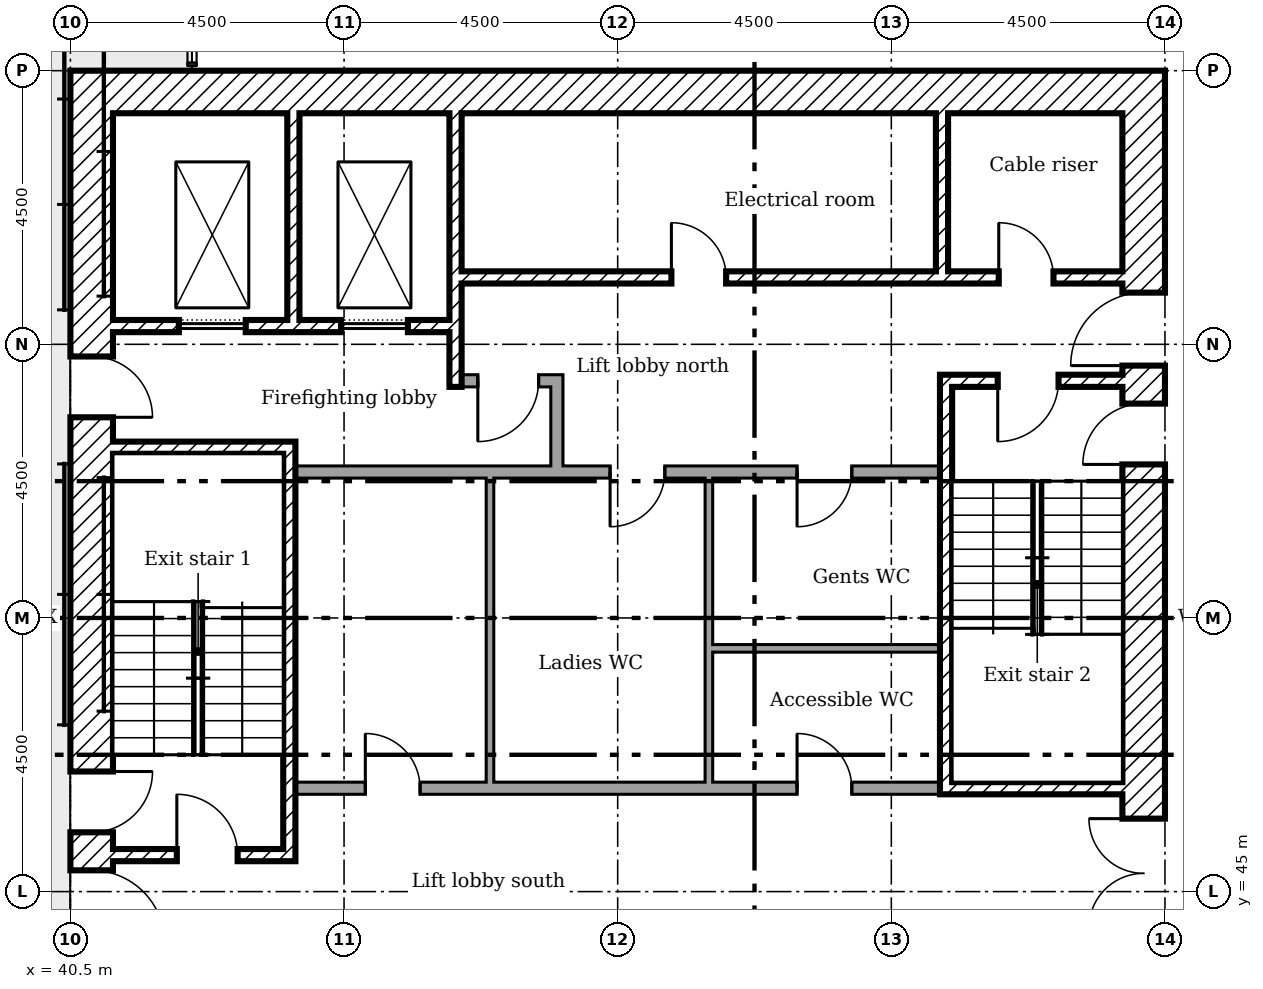
"""IFC4 building model, lengths in metres.
Left out: names, types, materials, properties, quantities, classifications, styles, units other than length and angle.
Written with IfcOpenShell. Run it as: python <this file> out.ifc"""

import sys

from ifc_helpers import new_model, si_unit, direction, frame, frame_2d, origin, place, context, subcontext, project, spatial, rectangle, extrude, element, fill, save


model = new_model("IFC4")
c1 = context("Model", 3, precision=1e-05, world=origin(), true_north=direction((0.0, 1.0)))
c2 = subcontext(c1, "Body", "Model", "MODEL_VIEW")
j1 = project(units=[si_unit("LENGTHUNIT", "METRE"), si_unit("PLANEANGLEUNIT", "RADIAN")], contexts=[c1])
p1 = place(None, origin())
s1 = spatial("IfcSite", under=j1, at=p1, CompositionType="ELEMENT")
p2 = place(p1, origin())
s2 = spatial("IfcBuilding", under=s1, at=p2, CompositionType="ELEMENT")
p3 = place(p2, frame((0.0, 0.0, 92.0)))
s3 = spatial("IfcBuildingStorey", under=s2, at=p3, CompositionType="ELEMENT", Elevation=92.0)
p4 = place(p3, frame((58.15, 40.5, 0.0), z_axis=(0.0, 0.0, 1.0), x_axis=(0.0, 1.0, 0.0)))
e1 = element("IfcWall", 1, at=p4, inside=s3, PredefinedType="SHEAR", context=c2, shape_type="SweptSolid", body=[
    extrude(rectangle(XDim=18.0, YDim=0.7, at=frame_2d((9.0, 0.0))), origin(), (0.0, 0.0, 1.0), 3.35),
])
p5 = place(p4, frame((13.15, 0.0, 0.0)))
e2 = element("IfcOpeningElement", 2, at=p5, cuts=e1, PredefinedType="OPENING", context=c2, shape_type="SweptSolid", body=[
    extrude(rectangle(XDim=1.2, YDim=2.1, at=frame_2d((0.6, 1.05))), frame((0.0, 0.36, 0.0), z_axis=(0.0, -1.0, 0.0), x_axis=(1.0, 0.0, 0.0)), (0.0, 0.0, 1.0), 0.72),
])
p6 = place(p4, frame((3.9, 0.0, 0.0)))
e3 = element("IfcOpeningElement", 3, at=p6, cuts=e1, PredefinedType="OPENING", context=c2, shape_type="SweptSolid", body=[
    extrude(rectangle(XDim=1.8, YDim=2.1, at=frame_2d((0.9, 1.05))), frame((0.0, 0.36, 0.0), z_axis=(0.0, -1.0, 0.0), x_axis=(1.0, 0.0, 0.0)), (0.0, 0.0, 1.0), 0.72),
])
p7 = place(p4, frame((11.525, 0.0, 0.0)))
e4 = element("IfcOpeningElement", 4, at=p7, cuts=e1, PredefinedType="OPENING", context=c2, shape_type="SweptSolid", body=[
    extrude(rectangle(XDim=1.0, YDim=2.1, at=frame_2d((0.5, 1.05))), frame((0.0, 0.36, 0.0), z_axis=(0.0, -1.0, 0.0), x_axis=(1.0, 0.0, 0.0)), (0.0, 0.0, 1.0), 0.72),
])
p8 = place(p3, frame((41.2, 58.15, 0.0)))
e5 = element("IfcWall", 5, at=p8, inside=s3, PredefinedType="SHEAR", context=c2, shape_type="SweptSolid", body=[
    extrude(rectangle(XDim=16.6, YDim=0.7, at=frame_2d((8.3, 0.0))), origin(), (0.0, 0.0, 1.0), 3.35),
])
p9 = place(p3, frame((40.85, 40.5, 0.0), z_axis=(0.0, 0.0, 1.0), x_axis=(0.0, 1.0, 0.0)))
e6 = element("IfcWall", 6, at=p9, inside=s3, PredefinedType="SHEAR", context=c2, shape_type="SweptSolid", body=[
    extrude(rectangle(XDim=18.0, YDim=0.7, at=frame_2d((9.0, 0.0))), origin(), (0.0, 0.0, 1.0), 3.35),
])
p10 = place(p9, frame((3.65, 0.0, 0.0)))
e7 = element("IfcOpeningElement", 7, at=p10, cuts=e6, PredefinedType="OPENING", context=c2, shape_type="SweptSolid", body=[
    extrude(rectangle(XDim=1.2, YDim=2.1, at=frame_2d((0.6, 1.05))), frame((0.0, 0.36, 0.0), z_axis=(0.0, -1.0, 0.0), x_axis=(1.0, 0.0, 0.0)), (0.0, 0.0, 1.0), 0.72),
])
p11 = place(p9, frame((5.475, 0.0, 0.0)))
e8 = element("IfcOpeningElement", 8, at=p11, cuts=e6, PredefinedType="OPENING", context=c2, shape_type="SweptSolid", body=[
    extrude(rectangle(XDim=1.0, YDim=2.1, at=frame_2d((0.5, 1.05))), frame((0.0, 0.36, 0.0), z_axis=(0.0, -1.0, 0.0), x_axis=(1.0, 0.0, 0.0)), (0.0, 0.0, 1.0), 0.72),
])
p12 = place(p9, frame((12.3, 0.0, 0.0)))
e9 = element("IfcOpeningElement", 9, at=p12, cuts=e6, PredefinedType="OPENING", context=c2, shape_type="SweptSolid", body=[
    extrude(rectangle(XDim=1.0, YDim=2.1, at=frame_2d((0.5, 1.05))), frame((0.0, 0.36, 0.0), z_axis=(0.0, -1.0, 0.0), x_axis=(1.0, 0.0, 0.0)), (0.0, 0.0, 1.0), 0.72),
])
p13 = place(p3, frame((44.167, 57.8, 0.0), z_axis=(0.0, 0.0, 1.0), x_axis=(0.0, -1.0, 0.0)))
e10 = element("IfcWall", 10, at=p13, inside=s3, PredefinedType="SHEAR", context=c2, shape_type="SweptSolid", body=[
    extrude(rectangle(XDim=3.4, YDim=0.2, at=frame_2d((1.7, 0.0))), origin(), (0.0, 0.0, 1.0), 3.35),
])
p14 = place(p3, frame((46.833, 57.8, 0.0), z_axis=(0.0, 0.0, 1.0), x_axis=(0.0, -1.0, 0.0)))
e11 = element("IfcWall", 11, at=p14, inside=s3, PredefinedType="SHEAR", context=c2, shape_type="SweptSolid", body=[
    extrude(rectangle(XDim=4.5, YDim=0.2, at=frame_2d((2.25, 0.0))), origin(), (0.0, 0.0, 1.0), 3.35),
])
p15 = place(p3, frame((54.833, 57.8, 0.0), z_axis=(0.0, 0.0, 1.0), x_axis=(0.0, -1.0, 0.0)))
e12 = element("IfcWall", 12, at=p15, inside=s3, PredefinedType="SHEAR", context=c2, shape_type="SweptSolid", body=[
    extrude(rectangle(XDim=2.6, YDim=0.2, at=frame_2d((1.3, 0.0))), origin(), (0.0, 0.0, 1.0), 3.35),
])
p16 = place(p3, frame((48.5, 51.9, 0.0), z_axis=(0.0, 0.0, 1.0), x_axis=(0.0, 1.0, 0.0)))
e13 = element("IfcWall", 13, at=p16, inside=s3, PredefinedType="PARTITIONING", context=c2, shape_type="SweptSolid", body=[
    extrude(rectangle(XDim=1.6, YDim=0.2, at=frame_2d((0.8, 0.0))), origin(), (0.0, 0.0, 1.0), 3.35),
])
p17 = place(p3, frame((46.933, 53.4, 0.0)))
e14 = element("IfcWall", 14, at=p17, inside=s3, PredefinedType="PARTITIONING", context=c2, shape_type="SweptSolid", body=[
    extrude(rectangle(XDim=1.467, YDim=0.2, at=frame_2d((0.733, 0.0))), origin(), (0.0, 0.0, 1.0), 3.35),
])
p18 = place(p17, frame((0.267, 0.0, 0.0)))
e15 = element("IfcOpeningElement", 15, at=p18, cuts=e14, PredefinedType="OPENING", context=c2, shape_type="SweptSolid", body=[
    extrude(rectangle(XDim=1.0, YDim=2.1, at=frame_2d((0.5, 1.05))), frame((0.0, 0.11, 0.0), z_axis=(0.0, -1.0, 0.0), x_axis=(1.0, 0.0, 0.0)), (0.0, 0.0, 1.0), 0.22),
])
p19 = place(p3, frame((46.933, 55.1, 0.0)))
e16 = element("IfcWall", 16, at=p19, inside=s3, PredefinedType="SHEAR", context=c2, shape_type="SweptSolid", body=[
    extrude(rectangle(XDim=10.867, YDim=0.2, at=frame_2d((5.433, 0.0))), origin(), (0.0, 0.0, 1.0), 3.35),
])
p20 = place(p19, frame((8.833, 0.0, 0.0)))
e17 = element("IfcOpeningElement", 17, at=p20, cuts=e16, PredefinedType="OPENING", context=c2, shape_type="SweptSolid", body=[
    extrude(rectangle(XDim=0.9, YDim=2.1, at=frame_2d((0.45, 1.05))), frame((0.0, 0.11, 0.0), z_axis=(0.0, -1.0, 0.0), x_axis=(1.0, 0.0, 0.0)), (0.0, 0.0, 1.0), 0.22),
])
p21 = place(p19, frame((3.45, 0.0, 0.0)))
e18 = element("IfcOpeningElement", 18, at=p21, cuts=e16, PredefinedType="OPENING", context=c2, shape_type="SweptSolid", body=[
    extrude(rectangle(XDim=0.9, YDim=2.1, at=frame_2d((0.45, 1.05))), frame((0.0, 0.11, 0.0), z_axis=(0.0, -1.0, 0.0), x_axis=(1.0, 0.0, 0.0)), (0.0, 0.0, 1.0), 0.22),
])
p22 = place(p3, frame((41.2, 54.3, 0.0)))
e19 = element("IfcWall", 19, at=p22, inside=s3, PredefinedType="SHEAR", context=c2, shape_type="SweptSolid", body=[
    extrude(rectangle(XDim=5.533, YDim=0.2, at=frame_2d((2.767, 0.0))), origin(), (0.0, 0.0, 1.0), 3.35),
])
p23 = place(p22, frame((1.083, 0.0, 0.0)))
e20 = element("IfcOpeningElement", 20, at=p23, cuts=e19, PredefinedType="OPENING", context=c2, shape_type="SweptSolid", body=[
    extrude(rectangle(XDim=1.1, YDim=2.1, at=frame_2d((0.55, 1.05))), frame((0.0, 0.11, 0.0), z_axis=(0.0, -1.0, 0.0), x_axis=(1.0, 0.0, 0.0)), (0.0, 0.0, 1.0), 0.22),
])
p24 = place(p22, frame((3.75, 0.0, 0.0)))
e21 = element("IfcOpeningElement", 21, at=p24, cuts=e19, PredefinedType="OPENING", context=c2, shape_type="SweptSolid", body=[
    extrude(rectangle(XDim=1.1, YDim=2.1, at=frame_2d((0.55, 1.05))), frame((0.0, 0.11, 0.0), z_axis=(0.0, -1.0, 0.0), x_axis=(1.0, 0.0, 0.0)), (0.0, 0.0, 1.0), 0.22),
])
p25 = place(p3, frame((44.1, 45.5, 0.0), z_axis=(0.0, 0.0, 1.0), x_axis=(0.0, 1.0, 0.0)))
e22 = element("IfcWall", 22, at=p25, inside=s3, PredefinedType="SHEAR", context=c2, shape_type="SweptSolid", body=[
    extrude(rectangle(XDim=6.9, YDim=0.2, at=frame_2d((3.45, 0.0))), origin(), (0.0, 0.0, 1.0), 3.35),
])
p26 = place(p3, frame((41.2, 52.3, 0.0)))
e23 = element("IfcWall", 23, at=p26, inside=s3, PredefinedType="SHEAR", context=c2, shape_type="SweptSolid", body=[
    extrude(rectangle(XDim=2.8, YDim=0.2, at=frame_2d((1.4, 0.0))), origin(), (0.0, 0.0, 1.0), 3.35),
])
p27 = place(p3, frame((41.2, 45.6, 0.0)))
e24 = element("IfcWall", 24, at=p27, inside=s3, PredefinedType="SHEAR", context=c2, shape_type="SweptSolid", body=[
    extrude(rectangle(XDim=2.8, YDim=0.2, at=frame_2d((1.4, 0.0))), origin(), (0.0, 0.0, 1.0), 3.35),
])
p28 = place(p27, frame((1.05, 0.0, 0.0)))
e25 = element("IfcOpeningElement", 25, at=p28, cuts=e24, PredefinedType="OPENING", context=c2, shape_type="SweptSolid", body=[
    extrude(rectangle(XDim=1.0, YDim=2.1, at=frame_2d((0.5, 1.05))), frame((0.0, 0.11, 0.0), z_axis=(0.0, -1.0, 0.0), x_axis=(1.0, 0.0, 0.0)), (0.0, 0.0, 1.0), 0.22),
])
p29 = place(p3, frame((54.8, 53.4, 0.0)))
e26 = element("IfcWall", 26, at=p29, inside=s3, PredefinedType="SHEAR", context=c2, shape_type="SweptSolid", body=[
    extrude(rectangle(XDim=3.0, YDim=0.2, at=frame_2d((1.5, 0.0))), origin(), (0.0, 0.0, 1.0), 3.35),
])
p30 = place(p29, frame((0.95, 0.0, 0.0)))
e27 = element("IfcOpeningElement", 27, at=p30, cuts=e26, PredefinedType="OPENING", context=c2, shape_type="SweptSolid", body=[
    extrude(rectangle(XDim=1.0, YDim=2.1, at=frame_2d((0.5, 1.05))), frame((0.0, 0.11, 0.0), z_axis=(0.0, -1.0, 0.0), x_axis=(1.0, 0.0, 0.0)), (0.0, 0.0, 1.0), 0.22),
])
p31 = place(p3, frame((54.8, 46.7, 0.0)))
e28 = element("IfcWall", 28, at=p31, inside=s3, PredefinedType="SHEAR", context=c2, shape_type="SweptSolid", body=[
    extrude(rectangle(XDim=3.0, YDim=0.2, at=frame_2d((1.5, 0.0))), origin(), (0.0, 0.0, 1.0), 3.35),
])
p32 = place(p3, frame((54.9, 46.8, 0.0), z_axis=(0.0, 0.0, 1.0), x_axis=(0.0, 1.0, 0.0)))
e29 = element("IfcWall", 29, at=p32, inside=s3, PredefinedType="SHEAR", context=c2, shape_type="SweptSolid", body=[
    extrude(rectangle(XDim=6.5, YDim=0.2, at=frame_2d((3.25, 0.0))), origin(), (0.0, 0.0, 1.0), 3.35),
])
p33 = place(p3, frame((44.2, 51.9, 0.0)))
e30 = element("IfcWall", 30, at=p33, inside=s3, PredefinedType="PARTITIONING", context=c2, shape_type="SweptSolid", body=[
    extrude(rectangle(XDim=10.6, YDim=0.2, at=frame_2d((5.3, 0.0))), origin(), (0.0, 0.0, 1.0), 3.35),
])
p34 = place(p33, frame((5.175, 0.0, 0.0)))
e31 = element("IfcOpeningElement", 31, at=p34, cuts=e30, PredefinedType="OPENING", context=c2, shape_type="SweptSolid", body=[
    extrude(rectangle(XDim=0.9, YDim=2.1, at=frame_2d((0.45, 1.05))), frame((0.0, 0.11, 0.0), z_axis=(0.0, -1.0, 0.0), x_axis=(1.0, 0.0, 0.0)), (0.0, 0.0, 1.0), 0.22),
])
p35 = place(p33, frame((8.25, 0.0, 0.0)))
e32 = element("IfcOpeningElement", 32, at=p35, cuts=e30, PredefinedType="OPENING", context=c2, shape_type="SweptSolid", body=[
    extrude(rectangle(XDim=0.9, YDim=2.1, at=frame_2d((0.45, 1.05))), frame((0.0, 0.11, 0.0), z_axis=(0.0, -1.0, 0.0), x_axis=(1.0, 0.0, 0.0)), (0.0, 0.0, 1.0), 0.22),
])
p36 = place(p3, frame((44.2, 46.7, 0.0)))
e33 = element("IfcWall", 33, at=p36, inside=s3, PredefinedType="PARTITIONING", context=c2, shape_type="SweptSolid", body=[
    extrude(rectangle(XDim=10.6, YDim=0.2, at=frame_2d((5.3, 0.0))), origin(), (0.0, 0.0, 1.0), 3.35),
])
p37 = place(p36, frame((1.15, 0.0, 0.0)))
e34 = element("IfcOpeningElement", 34, at=p37, cuts=e33, PredefinedType="OPENING", context=c2, shape_type="SweptSolid", body=[
    extrude(rectangle(XDim=0.9, YDim=2.1, at=frame_2d((0.45, 1.05))), frame((0.0, 0.11, 0.0), z_axis=(0.0, -1.0, 0.0), x_axis=(1.0, 0.0, 0.0)), (0.0, 0.0, 1.0), 0.22),
])
p38 = place(p36, frame((8.25, 0.0, 0.0)))
e35 = element("IfcOpeningElement", 35, at=p38, cuts=e33, PredefinedType="OPENING", context=c2, shape_type="SweptSolid", body=[
    extrude(rectangle(XDim=0.9, YDim=2.1, at=frame_2d((0.45, 1.05))), frame((0.0, 0.11, 0.0), z_axis=(0.0, -1.0, 0.0), x_axis=(1.0, 0.0, 0.0)), (0.0, 0.0, 1.0), 0.22),
])
p39 = place(p3, frame((47.4, 46.8, 0.0), z_axis=(0.0, 0.0, 1.0), x_axis=(0.0, 1.0, 0.0)))
e36 = element("IfcWall", 36, at=p39, inside=s3, PredefinedType="PARTITIONING", context=c2, shape_type="SweptSolid", body=[
    extrude(rectangle(XDim=5.0, YDim=0.125, at=frame_2d((2.5, 0.0))), origin(), (0.0, 0.0, 1.0), 3.35),
])
p40 = place(p3, frame((51.0, 46.8, 0.0), z_axis=(0.0, 0.0, 1.0), x_axis=(0.0, 1.0, 0.0)))
e37 = element("IfcWall", 37, at=p40, inside=s3, PredefinedType="PARTITIONING", context=c2, shape_type="SweptSolid", body=[
    extrude(rectangle(XDim=2.262, YDim=0.125, at=frame_2d((1.131, 0.0))), origin(), (0.0, 0.0, 1.0), 3.35),
])
p41 = place(p3, frame((54.8, 49.0, 0.0), z_axis=(0.0, 0.0, 1.0), x_axis=(-1.0, 0.0, 0.0)))
e38 = element("IfcWall", 38, at=p41, inside=s3, PredefinedType="PARTITIONING", context=c2, shape_type="SweptSolid", body=[
    extrude(rectangle(XDim=3.738, YDim=0.125, at=frame_2d((1.869, 0.0))), origin(), (0.0, 0.0, 1.0), 3.35),
])
p42 = place(p3, frame((51.0, 49.0, 0.0), z_axis=(0.0, 0.0, 1.0), x_axis=(0.0, 1.0, 0.0)))
e39 = element("IfcWall", 39, at=p42, inside=s3, PredefinedType="PARTITIONING", context=c2, shape_type="SweptSolid", body=[
    extrude(rectangle(XDim=2.8, YDim=0.125, at=frame_2d((1.4, 0.0))), origin(), (0.0, 0.0, 1.0), 3.35),
])
p43 = place(p5, origin())
e40 = element("IfcDoor", 40, at=p43, inside=s3, OperationType="SINGLE_SWING_RIGHT", PredefinedType="DOOR", context=c2, shape_type="SweptSolid", body=[
    extrude(rectangle(XDim=1.2, YDim=2.1, at=frame_2d((0.6, 1.05))), frame((0.0, 0.025, 0.0), z_axis=(0.0, -1.0, 0.0), x_axis=(1.0, 0.0, 0.0)), (0.0, 0.0, 1.0), 0.05),
])
fill(e2, e40)
p44 = place(p6, origin())
e41 = element("IfcDoor", 41, at=p44, inside=s3, OperationType="DOUBLE_DOOR_SINGLE_SWING", PredefinedType="DOOR", context=c2, shape_type="SweptSolid", body=[
    extrude(rectangle(XDim=1.8, YDim=2.1, at=frame_2d((0.9, 1.05))), frame((0.0, 0.025, 0.0), z_axis=(0.0, -1.0, 0.0), x_axis=(1.0, 0.0, 0.0)), (0.0, 0.0, 1.0), 0.05),
])
fill(e3, e41)
p45 = place(p10, frame((1.2, 0.0, 0.0), x_axis=(-1.0, 0.0, 0.0)))
e42 = element("IfcDoor", 42, at=p45, inside=s3, OperationType="SINGLE_SWING_LEFT", PredefinedType="DOOR", context=c2, shape_type="SweptSolid", body=[
    extrude(rectangle(XDim=1.2, YDim=2.1, at=frame_2d((0.6, 1.05))), frame((0.0, 0.025, 0.0), z_axis=(0.0, -1.0, 0.0), x_axis=(1.0, 0.0, 0.0)), (0.0, 0.0, 1.0), 0.05),
])
fill(e7, e42)
p46 = place(p28, origin())
e43 = element("IfcDoor", 43, at=p46, inside=s3, OperationType="SINGLE_SWING_RIGHT", PredefinedType="DOOR", context=c2, shape_type="SweptSolid", body=[
    extrude(rectangle(XDim=1.0, YDim=2.1, at=frame_2d((0.5, 1.05))), frame((0.0, 0.025, 0.0), z_axis=(0.0, -1.0, 0.0), x_axis=(1.0, 0.0, 0.0)), (0.0, 0.0, 1.0), 0.05),
])
fill(e25, e43)
p47 = place(p11, frame((1.0, 0.0, 0.0), x_axis=(-1.0, 0.0, 0.0)))
e44 = element("IfcDoor", 44, at=p47, inside=s3, OperationType="SINGLE_SWING_RIGHT", PredefinedType="DOOR", context=c2, shape_type="SweptSolid", body=[
    extrude(rectangle(XDim=1.0, YDim=2.1, at=frame_2d((0.5, 1.05))), frame((0.0, 0.025, 0.0), z_axis=(0.0, -1.0, 0.0), x_axis=(1.0, 0.0, 0.0)), (0.0, 0.0, 1.0), 0.05),
])
fill(e8, e44)
p48 = place(p30, frame((1.0, 0.0, 0.0), x_axis=(-1.0, 0.0, 0.0)))
e45 = element("IfcDoor", 45, at=p48, inside=s3, OperationType="SINGLE_SWING_LEFT", PredefinedType="DOOR", context=c2, shape_type="SweptSolid", body=[
    extrude(rectangle(XDim=1.0, YDim=2.1, at=frame_2d((0.5, 1.05))), frame((0.0, 0.025, 0.0), z_axis=(0.0, -1.0, 0.0), x_axis=(1.0, 0.0, 0.0)), (0.0, 0.0, 1.0), 0.05),
])
fill(e27, e45)
p49 = place(p7, origin())
e46 = element("IfcDoor", 46, at=p49, inside=s3, OperationType="SINGLE_SWING_RIGHT", PredefinedType="DOOR", context=c2, shape_type="SweptSolid", body=[
    extrude(rectangle(XDim=1.0, YDim=2.1, at=frame_2d((0.5, 1.05))), frame((0.0, 0.025, 0.0), z_axis=(0.0, -1.0, 0.0), x_axis=(1.0, 0.0, 0.0)), (0.0, 0.0, 1.0), 0.05),
])
fill(e4, e46)
p50 = place(p18, frame((1.0, 0.0, 0.0), x_axis=(-1.0, 0.0, 0.0)))
e47 = element("IfcDoor", 47, at=p50, inside=s3, OperationType="SINGLE_SWING_LEFT", PredefinedType="DOOR", context=c2, shape_type="SweptSolid", body=[
    extrude(rectangle(XDim=1.0, YDim=2.1, at=frame_2d((0.5, 1.05))), frame((0.0, 0.025, 0.0), z_axis=(0.0, -1.0, 0.0), x_axis=(1.0, 0.0, 0.0)), (0.0, 0.0, 1.0), 0.05),
])
fill(e15, e47)
p51 = place(p12, frame((1.0, 0.0, 0.0), x_axis=(-1.0, 0.0, 0.0)))
e48 = element("IfcDoor", 48, at=p51, inside=s3, OperationType="SINGLE_SWING_LEFT", PredefinedType="DOOR", context=c2, shape_type="SweptSolid", body=[
    extrude(rectangle(XDim=1.0, YDim=2.1, at=frame_2d((0.5, 1.05))), frame((0.0, 0.025, 0.0), z_axis=(0.0, -1.0, 0.0), x_axis=(1.0, 0.0, 0.0)), (0.0, 0.0, 1.0), 0.05),
])
fill(e9, e48)
p52 = place(p20, origin())
e49 = element("IfcDoor", 49, at=p52, inside=s3, OperationType="SINGLE_SWING_RIGHT", PredefinedType="DOOR", context=c2, shape_type="SweptSolid", body=[
    extrude(rectangle(XDim=0.9, YDim=2.1, at=frame_2d((0.45, 1.05))), frame((0.0, 0.025, 0.0), z_axis=(0.0, -1.0, 0.0), x_axis=(1.0, 0.0, 0.0)), (0.0, 0.0, 1.0), 0.05),
])
fill(e17, e49)
p53 = place(p21, origin())
e50 = element("IfcDoor", 50, at=p53, inside=s3, OperationType="SINGLE_SWING_RIGHT", PredefinedType="DOOR", context=c2, shape_type="SweptSolid", body=[
    extrude(rectangle(XDim=0.9, YDim=2.1, at=frame_2d((0.45, 1.05))), frame((0.0, 0.025, 0.0), z_axis=(0.0, -1.0, 0.0), x_axis=(1.0, 0.0, 0.0)), (0.0, 0.0, 1.0), 0.05),
])
fill(e18, e50)
p54 = place(p37, origin())
e51 = element("IfcDoor", 51, at=p54, inside=s3, OperationType="SINGLE_SWING_RIGHT", PredefinedType="DOOR", context=c2, shape_type="SweptSolid", body=[
    extrude(rectangle(XDim=0.9, YDim=2.1, at=frame_2d((0.45, 1.05))), frame((0.0, 0.025, 0.0), z_axis=(0.0, -1.0, 0.0), x_axis=(1.0, 0.0, 0.0)), (0.0, 0.0, 1.0), 0.05),
])
fill(e34, e51)
p55 = place(p34, frame((0.9, 0.0, 0.0), x_axis=(-1.0, 0.0, 0.0)))
e52 = element("IfcDoor", 52, at=p55, inside=s3, OperationType="SINGLE_SWING_LEFT", PredefinedType="DOOR", context=c2, shape_type="SweptSolid", body=[
    extrude(rectangle(XDim=0.9, YDim=2.1, at=frame_2d((0.45, 1.05))), frame((0.0, 0.025, 0.0), z_axis=(0.0, -1.0, 0.0), x_axis=(1.0, 0.0, 0.0)), (0.0, 0.0, 1.0), 0.05),
])
fill(e31, e52)
p56 = place(p38, origin())
e53 = element("IfcDoor", 53, at=p56, inside=s3, OperationType="SINGLE_SWING_RIGHT", PredefinedType="DOOR", context=c2, shape_type="SweptSolid", body=[
    extrude(rectangle(XDim=0.9, YDim=2.1, at=frame_2d((0.45, 1.05))), frame((0.0, 0.025, 0.0), z_axis=(0.0, -1.0, 0.0), x_axis=(1.0, 0.0, 0.0)), (0.0, 0.0, 1.0), 0.05),
])
fill(e35, e53)
p57 = place(p35, frame((0.9, 0.0, 0.0), x_axis=(-1.0, 0.0, 0.0)))
e54 = element("IfcDoor", 54, at=p57, inside=s3, OperationType="SINGLE_SWING_LEFT", PredefinedType="DOOR", context=c2, shape_type="SweptSolid", body=[
    extrude(rectangle(XDim=0.9, YDim=2.1, at=frame_2d((0.45, 1.05))), frame((0.0, 0.025, 0.0), z_axis=(0.0, -1.0, 0.0), x_axis=(1.0, 0.0, 0.0)), (0.0, 0.0, 1.0), 0.05),
])
fill(e32, e54)
p58 = place(p23, origin())
e55 = element("IfcDoor", 55, at=p58, inside=s3, OperationType="SLIDING_TO_LEFT", PredefinedType="DOOR", context=c2, shape_type="SweptSolid", body=[
    extrude(rectangle(XDim=1.1, YDim=2.1, at=frame_2d((0.55, 1.05))), frame((0.0, 0.025, 0.0), z_axis=(0.0, -1.0, 0.0), x_axis=(1.0, 0.0, 0.0)), (0.0, 0.0, 1.0), 0.05),
])
fill(e20, e55)
p59 = place(p24, origin())
e56 = element("IfcDoor", 56, at=p59, inside=s3, OperationType="SLIDING_TO_LEFT", PredefinedType="DOOR", context=c2, shape_type="SweptSolid", body=[
    extrude(rectangle(XDim=1.1, YDim=2.1, at=frame_2d((0.55, 1.05))), frame((0.0, 0.025, 0.0), z_axis=(0.0, -1.0, 0.0), x_axis=(1.0, 0.0, 0.0)), (0.0, 0.0, 1.0), 0.05),
])
fill(e21, e56)
save(model, sys.argv[1])
